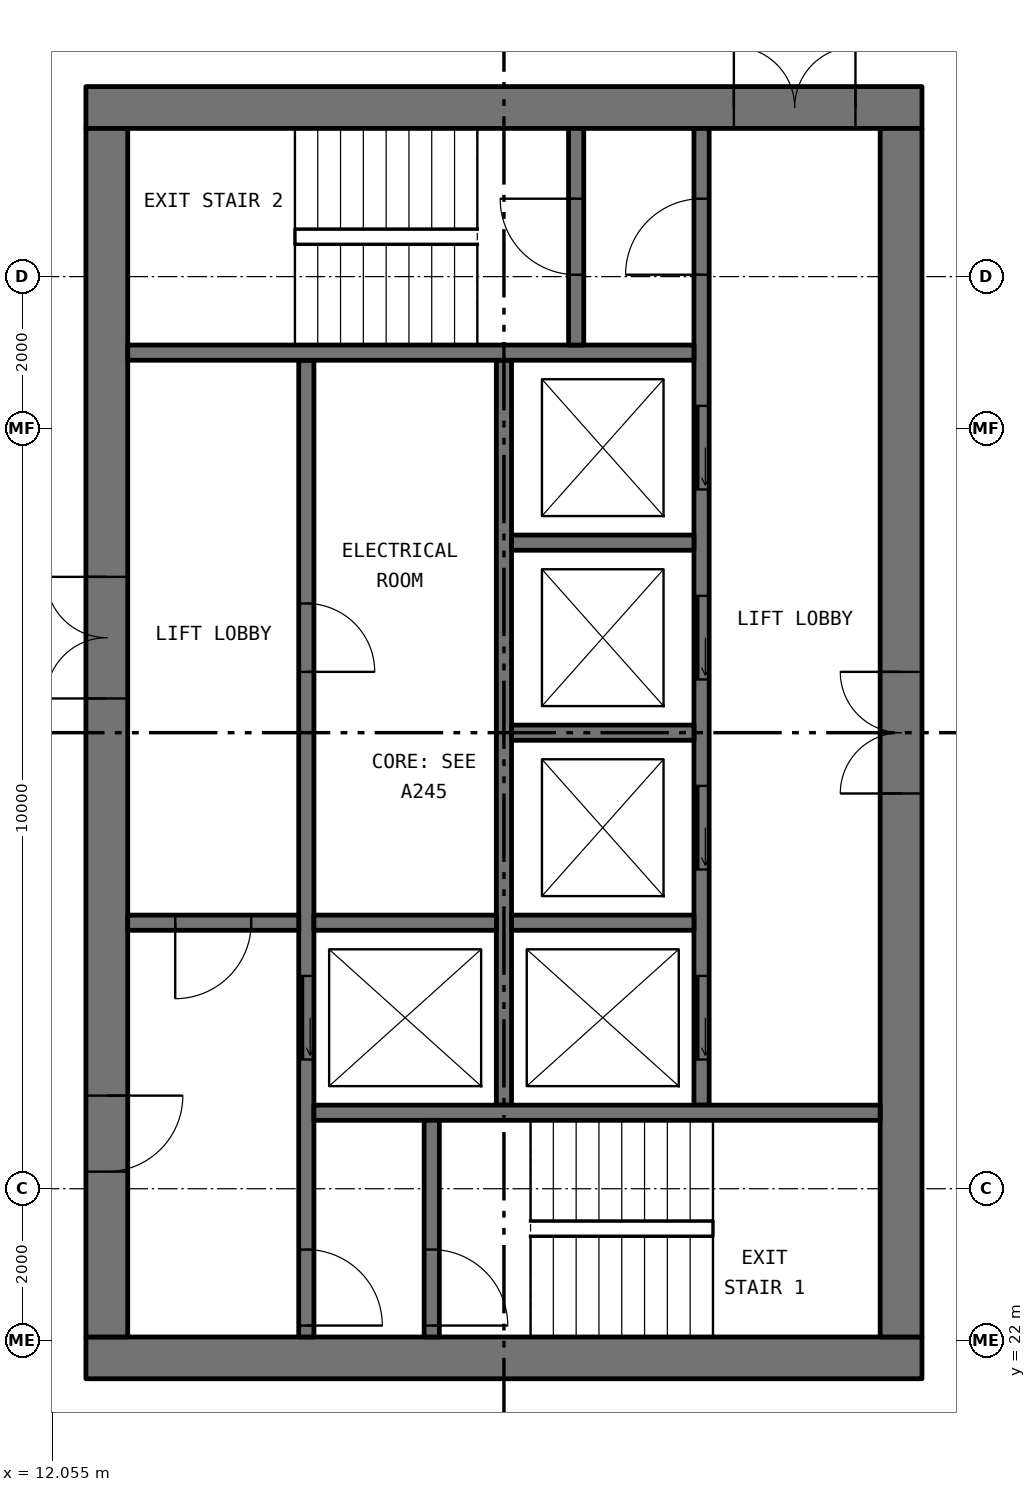
"""IFC4 building model, lengths in metres.
Left out: names, types, materials, properties, quantities, classifications, styles, units other than length and angle.
Written with IfcOpenShell. Run it as: python <this file> out.ifc"""

import sys

from ifc_helpers import new_model, si_unit, direction, frame, frame_2d, origin, place, context, subcontext, project, spatial, rectangle, extrude, element, fill, save


model = new_model("IFC4")
c1 = context("Model", 3, precision=1e-05, world=origin(), true_north=direction((0.0, 1.0)))
c2 = subcontext(c1, "Body", "Model", "MODEL_VIEW")
j1 = project(units=[si_unit("LENGTHUNIT", "METRE"), si_unit("PLANEANGLEUNIT", "RADIAN")], contexts=[c1])
p1 = place(None, origin())
s1 = spatial("IfcSite", under=j1, at=p1, CompositionType="ELEMENT")
p2 = place(p1, origin())
s2 = spatial("IfcBuilding", under=s1, at=p2, CompositionType="ELEMENT")
p3 = place(p2, frame((0.0, 0.0, 168.6)))
s3 = spatial("IfcBuildingStorey", under=s2, at=p3, CompositionType="ELEMENT", Elevation=168.6)
p4 = place(p3, frame((12.5, 21.775, 0.0), z_axis=(0.0, 0.0, 1.0), x_axis=(1.0, 0.0, 0.0)))
e1 = element("IfcWall", 1, at=p4, inside=s3, PredefinedType="SHEAR", context=c2, shape_type="SweptSolid", body=[
    extrude(rectangle(XDim=11.0, YDim=0.55, at=frame_2d((5.5, 0.0))), origin(), (0.0, 0.0, 1.0), 3.05),
])
p5 = place(p3, frame((12.5, 38.225, 0.0), z_axis=(0.0, 0.0, 1.0), x_axis=(1.0, 0.0, 0.0)))
e2 = element("IfcWall", 2, at=p5, inside=s3, PredefinedType="SHEAR", context=c2, shape_type="SweptSolid", body=[
    extrude(rectangle(XDim=11.0, YDim=0.55, at=frame_2d((5.5, 0.0))), origin(), (0.0, 0.0, 1.0), 3.05),
])
p6 = place(p5, frame((8.525, 0.0, 0.0)))
e3 = element("IfcOpeningElement", 3, at=p6, cuts=e2, PredefinedType="OPENING", context=c2, shape_type="SweptSolid", body=[
    extrude(rectangle(XDim=1.6, YDim=2.1, at=frame_2d((0.8, 1.05))), frame((0.0, 0.285, 0.0), z_axis=(0.0, -1.0, 0.0), x_axis=(1.0, 0.0, 0.0)), (0.0, 0.0, 1.0), 0.57),
])
p7 = place(p3, frame((12.775, 22.05, 0.0), z_axis=(0.0, 0.0, 1.0), x_axis=(0.0, 1.0, 0.0)))
e4 = element("IfcWall", 4, at=p7, inside=s3, PredefinedType="SHEAR", context=c2, shape_type="SweptSolid", body=[
    extrude(rectangle(XDim=15.9, YDim=0.55, at=frame_2d((7.95, 0.0))), origin(), (0.0, 0.0, 1.0), 3.05),
])
p8 = place(p7, frame((8.4, 0.0, 0.0)))
e5 = element("IfcOpeningElement", 5, at=p8, cuts=e4, PredefinedType="OPENING", context=c2, shape_type="SweptSolid", body=[
    extrude(rectangle(XDim=1.6, YDim=2.1, at=frame_2d((0.8, 1.05))), frame((0.0, 0.285, 0.0), z_axis=(0.0, -1.0, 0.0), x_axis=(1.0, 0.0, 0.0)), (0.0, 0.0, 1.0), 0.57),
])
p9 = place(p7, frame((2.175, 0.0, 0.0)))
e6 = element("IfcOpeningElement", 6, at=p9, cuts=e4, PredefinedType="OPENING", context=c2, shape_type="SweptSolid", body=[
    extrude(rectangle(XDim=1.0, YDim=2.1, at=frame_2d((0.5, 1.05))), frame((0.0, 0.285, 0.0), z_axis=(0.0, -1.0, 0.0), x_axis=(1.0, 0.0, 0.0)), (0.0, 0.0, 1.0), 0.57),
])
p10 = place(p3, frame((23.225, 22.05, 0.0), z_axis=(0.0, 0.0, 1.0), x_axis=(0.0, 1.0, 0.0)))
e7 = element("IfcWall", 7, at=p10, inside=s3, PredefinedType="SHEAR", context=c2, shape_type="SweptSolid", body=[
    extrude(rectangle(XDim=15.9, YDim=0.55, at=frame_2d((7.95, 0.0))), origin(), (0.0, 0.0, 1.0), 3.05),
])
p11 = place(p10, frame((7.15, 0.0, 0.0)))
e8 = element("IfcOpeningElement", 8, at=p11, cuts=e7, PredefinedType="OPENING", context=c2, shape_type="SweptSolid", body=[
    extrude(rectangle(XDim=1.6, YDim=2.1, at=frame_2d((0.8, 1.05))), frame((0.0, 0.285, 0.0), z_axis=(0.0, -1.0, 0.0), x_axis=(1.0, 0.0, 0.0)), (0.0, 0.0, 1.0), 0.57),
])
p12 = place(p3, frame((15.4, 22.05, 0.0), z_axis=(0.0, 0.0, 1.0), x_axis=(0.0, 1.0, 0.0)))
e9 = element("IfcWall", 9, at=p12, inside=s3, PredefinedType="SOLIDWALL", context=c2, shape_type="SweptSolid", body=[
    extrude(rectangle(XDim=12.85, YDim=0.2, at=frame_2d((6.425, 0.0))), origin(), (0.0, 0.0, 1.0), 3.05),
])
p13 = place(p12, frame((3.65, 0.0, 0.0)))
e10 = element("IfcOpeningElement", 10, at=p13, cuts=e9, PredefinedType="OPENING", context=c2, shape_type="SweptSolid", body=[
    extrude(rectangle(XDim=1.1, YDim=2.1, at=frame_2d((0.55, 1.05))), frame((0.0, 0.11, 0.0), z_axis=(0.0, -1.0, 0.0), x_axis=(1.0, 0.0, 0.0)), (0.0, 0.0, 1.0), 0.22),
])
p14 = place(p12, frame((0.15, 0.0, 0.0)))
e11 = element("IfcOpeningElement", 11, at=p14, cuts=e9, PredefinedType="OPENING", context=c2, shape_type="SweptSolid", body=[
    extrude(rectangle(XDim=1.0, YDim=2.1, at=frame_2d((0.5, 1.05))), frame((0.0, 0.11, 0.0), z_axis=(0.0, -1.0, 0.0), x_axis=(1.0, 0.0, 0.0)), (0.0, 0.0, 1.0), 0.22),
])
p15 = place(p12, frame((8.75, 0.0, 0.0)))
e12 = element("IfcOpeningElement", 12, at=p15, cuts=e9, PredefinedType="OPENING", context=c2, shape_type="SweptSolid", body=[
    extrude(rectangle(XDim=0.9, YDim=2.1, at=frame_2d((0.45, 1.05))), frame((0.0, 0.11, 0.0), z_axis=(0.0, -1.0, 0.0), x_axis=(1.0, 0.0, 0.0)), (0.0, 0.0, 1.0), 0.22),
])
p16 = place(p3, frame((20.6, 25.1, 0.0), z_axis=(0.0, 0.0, 1.0), x_axis=(0.0, 1.0, 0.0)))
e13 = element("IfcWall", 13, at=p16, inside=s3, PredefinedType="SOLIDWALL", context=c2, shape_type="SweptSolid", body=[
    extrude(rectangle(XDim=12.85, YDim=0.2, at=frame_2d((6.425, 0.0))), origin(), (0.0, 0.0, 1.0), 3.05),
])
p17 = place(p16, frame((0.6, 0.0, 0.0)))
e14 = element("IfcOpeningElement", 14, at=p17, cuts=e13, PredefinedType="OPENING", context=c2, shape_type="SweptSolid", body=[
    extrude(rectangle(XDim=1.1, YDim=2.1, at=frame_2d((0.55, 1.05))), frame((0.0, 0.11, 0.0), z_axis=(0.0, -1.0, 0.0), x_axis=(1.0, 0.0, 0.0)), (0.0, 0.0, 1.0), 0.22),
])
p18 = place(p16, frame((3.1, 0.0, 0.0)))
e15 = element("IfcOpeningElement", 15, at=p18, cuts=e13, PredefinedType="OPENING", context=c2, shape_type="SweptSolid", body=[
    extrude(rectangle(XDim=1.1, YDim=2.1, at=frame_2d((0.55, 1.05))), frame((0.0, 0.11, 0.0), z_axis=(0.0, -1.0, 0.0), x_axis=(1.0, 0.0, 0.0)), (0.0, 0.0, 1.0), 0.22),
])
p19 = place(p16, frame((5.6, 0.0, 0.0)))
e16 = element("IfcOpeningElement", 16, at=p19, cuts=e13, PredefinedType="OPENING", context=c2, shape_type="SweptSolid", body=[
    extrude(rectangle(XDim=1.1, YDim=2.1, at=frame_2d((0.55, 1.05))), frame((0.0, 0.11, 0.0), z_axis=(0.0, -1.0, 0.0), x_axis=(1.0, 0.0, 0.0)), (0.0, 0.0, 1.0), 0.22),
])
p20 = place(p16, frame((8.1, 0.0, 0.0)))
e17 = element("IfcOpeningElement", 17, at=p20, cuts=e13, PredefinedType="OPENING", context=c2, shape_type="SweptSolid", body=[
    extrude(rectangle(XDim=1.1, YDim=2.1, at=frame_2d((0.55, 1.05))), frame((0.0, 0.11, 0.0), z_axis=(0.0, -1.0, 0.0), x_axis=(1.0, 0.0, 0.0)), (0.0, 0.0, 1.0), 0.22),
])
p21 = place(p16, frame((10.925, 0.0, 0.0)))
e18 = element("IfcOpeningElement", 18, at=p21, cuts=e13, PredefinedType="OPENING", context=c2, shape_type="SweptSolid", body=[
    extrude(rectangle(XDim=1.0, YDim=2.1, at=frame_2d((0.5, 1.05))), frame((0.0, 0.11, 0.0), z_axis=(0.0, -1.0, 0.0), x_axis=(1.0, 0.0, 0.0)), (0.0, 0.0, 1.0), 0.22),
])
p22 = place(p3, frame((18.0, 25.1, 0.0), z_axis=(0.0, 0.0, 1.0), x_axis=(0.0, 1.0, 0.0)))
e19 = element("IfcWall", 19, at=p22, inside=s3, PredefinedType="SOLIDWALL", context=c2, shape_type="SweptSolid", body=[
    extrude(rectangle(XDim=9.8, YDim=0.2, at=frame_2d((4.9, 0.0))), origin(), (0.0, 0.0, 1.0), 3.05),
])
for number, where, z_axis, x_axis in (
    (20, (15.5, 25.0, 0.0), (0.0, 0.0, 1.0), (1.0, 0.0, 0.0)),
    (21, (13.05, 35.0, 0.0), (0.0, 0.0, 1.0), (1.0, 0.0, 0.0)),
):
    element("IfcWall", number, at=place(p3, frame(where, z_axis=z_axis, x_axis=x_axis)), inside=s3, PredefinedType="SOLIDWALL", context=c2, shape_type="SweptSolid", body=[
        extrude(rectangle(XDim=7.45, YDim=0.2, at=frame_2d((3.725, 0.0))), origin(), (0.0, 0.0, 1.0), 3.05),
    ])
p23 = place(p3, frame((13.05, 27.5, 0.0), z_axis=(0.0, 0.0, 1.0), x_axis=(1.0, 0.0, 0.0)))
e22 = element("IfcWall", 22, at=p23, inside=s3, PredefinedType="SOLIDWALL", context=c2, shape_type="SweptSolid", body=[
    extrude(rectangle(XDim=2.25, YDim=0.2, at=frame_2d((1.125, 0.0))), origin(), (0.0, 0.0, 1.0), 3.05),
])
p24 = place(p23, frame((0.625, 0.0, 0.0)))
e23 = element("IfcOpeningElement", 23, at=p24, cuts=e22, PredefinedType="OPENING", context=c2, shape_type="SweptSolid", body=[
    extrude(rectangle(XDim=1.0, YDim=2.1, at=frame_2d((0.5, 1.05))), frame((0.0, 0.11, 0.0), z_axis=(0.0, -1.0, 0.0), x_axis=(1.0, 0.0, 0.0)), (0.0, 0.0, 1.0), 0.22),
])
p25 = place(p3, frame((17.05, 22.05, 0.0), z_axis=(0.0, 0.0, 1.0), x_axis=(0.0, 1.0, 0.0)))
e24 = element("IfcWall", 24, at=p25, inside=s3, PredefinedType="SOLIDWALL", context=c2, shape_type="SweptSolid", body=[
    extrude(rectangle(XDim=2.85, YDim=0.2, at=frame_2d((1.425, 0.0))), origin(), (0.0, 0.0, 1.0), 3.05),
])
p26 = place(p25, frame((0.15, 0.0, 0.0)))
e25 = element("IfcOpeningElement", 25, at=p26, cuts=e24, PredefinedType="OPENING", context=c2, shape_type="SweptSolid", body=[
    extrude(rectangle(XDim=1.0, YDim=2.1, at=frame_2d((0.5, 1.05))), frame((0.0, 0.11, 0.0), z_axis=(0.0, -1.0, 0.0), x_axis=(1.0, 0.0, 0.0)), (0.0, 0.0, 1.0), 0.22),
])
p27 = place(p3, frame((18.95, 35.1, 0.0), z_axis=(0.0, 0.0, 1.0), x_axis=(0.0, 1.0, 0.0)))
e26 = element("IfcWall", 26, at=p27, inside=s3, PredefinedType="SOLIDWALL", context=c2, shape_type="SweptSolid", body=[
    extrude(rectangle(XDim=2.85, YDim=0.2, at=frame_2d((1.425, 0.0))), origin(), (0.0, 0.0, 1.0), 3.05),
])
p28 = place(p27, frame((0.925, 0.0, 0.0)))
e27 = element("IfcOpeningElement", 27, at=p28, cuts=e26, PredefinedType="OPENING", context=c2, shape_type="SweptSolid", body=[
    extrude(rectangle(XDim=1.0, YDim=2.1, at=frame_2d((0.5, 1.05))), frame((0.0, 0.11, 0.0), z_axis=(0.0, -1.0, 0.0), x_axis=(1.0, 0.0, 0.0)), (0.0, 0.0, 1.0), 0.22),
])
for number, where, z_axis, x_axis in (
    (28, (15.5, 27.5, 0.0), (0.0, 0.0, 1.0), (1.0, 0.0, 0.0)),
    (29, (18.1, 27.5, 0.0), (0.0, 0.0, 1.0), (1.0, 0.0, 0.0)),
    (30, (18.1, 30.0, 0.0), (0.0, 0.0, 1.0), (1.0, 0.0, 0.0)),
    (31, (18.1, 32.5, 0.0), (0.0, 0.0, 1.0), (1.0, 0.0, 0.0)),
):
    element("IfcWall", number, at=place(p3, frame(where, z_axis=z_axis, x_axis=x_axis)), inside=s3, PredefinedType="SOLIDWALL", context=c2, shape_type="SweptSolid", body=[
        extrude(rectangle(XDim=2.4, YDim=0.2, at=frame_2d((1.2, 0.0))), origin(), (0.0, 0.0, 1.0), 3.05),
    ])
p29 = place(p17, origin())
e32 = element("IfcDoor", 32, at=p29, inside=s3, OperationType="SLIDING_TO_LEFT", PredefinedType="DOOR", context=c2, shape_type="SweptSolid", body=[
    extrude(rectangle(XDim=1.1, YDim=2.1, at=frame_2d((0.55, 1.05))), frame((0.0, 0.025, 0.0), z_axis=(0.0, -1.0, 0.0), x_axis=(1.0, 0.0, 0.0)), (0.0, 0.0, 1.0), 0.05),
])
fill(e14, e32)
p30 = place(p18, origin())
e33 = element("IfcDoor", 33, at=p30, inside=s3, OperationType="SLIDING_TO_LEFT", PredefinedType="DOOR", context=c2, shape_type="SweptSolid", body=[
    extrude(rectangle(XDim=1.1, YDim=2.1, at=frame_2d((0.55, 1.05))), frame((0.0, 0.025, 0.0), z_axis=(0.0, -1.0, 0.0), x_axis=(1.0, 0.0, 0.0)), (0.0, 0.0, 1.0), 0.05),
])
fill(e15, e33)
p31 = place(p19, origin())
e34 = element("IfcDoor", 34, at=p31, inside=s3, OperationType="SLIDING_TO_LEFT", PredefinedType="DOOR", context=c2, shape_type="SweptSolid", body=[
    extrude(rectangle(XDim=1.1, YDim=2.1, at=frame_2d((0.55, 1.05))), frame((0.0, 0.025, 0.0), z_axis=(0.0, -1.0, 0.0), x_axis=(1.0, 0.0, 0.0)), (0.0, 0.0, 1.0), 0.05),
])
fill(e16, e34)
p32 = place(p20, origin())
e35 = element("IfcDoor", 35, at=p32, inside=s3, OperationType="SLIDING_TO_LEFT", PredefinedType="DOOR", context=c2, shape_type="SweptSolid", body=[
    extrude(rectangle(XDim=1.1, YDim=2.1, at=frame_2d((0.55, 1.05))), frame((0.0, 0.025, 0.0), z_axis=(0.0, -1.0, 0.0), x_axis=(1.0, 0.0, 0.0)), (0.0, 0.0, 1.0), 0.05),
])
fill(e17, e35)
p33 = place(p13, origin())
e36 = element("IfcDoor", 36, at=p33, inside=s3, OperationType="SLIDING_TO_LEFT", PredefinedType="DOOR", context=c2, shape_type="SweptSolid", body=[
    extrude(rectangle(XDim=1.1, YDim=2.1, at=frame_2d((0.55, 1.05))), frame((0.0, 0.025, 0.0), z_axis=(0.0, -1.0, 0.0), x_axis=(1.0, 0.0, 0.0)), (0.0, 0.0, 1.0), 0.05),
])
fill(e10, e36)
p34 = place(p26, frame((1.0, 0.0, 0.0), x_axis=(-1.0, 0.0, 0.0)))
e37 = element("IfcDoor", 37, at=p34, inside=s3, OperationType="SINGLE_SWING_LEFT", PredefinedType="DOOR", context=c2, shape_type="SweptSolid", body=[
    extrude(rectangle(XDim=1.0, YDim=2.1, at=frame_2d((0.5, 1.05))), frame((0.0, 0.025, 0.0), z_axis=(0.0, -1.0, 0.0), x_axis=(1.0, 0.0, 0.0)), (0.0, 0.0, 1.0), 0.05),
])
fill(e25, e37)
p35 = place(p14, frame((1.0, 0.0, 0.0), x_axis=(-1.0, 0.0, 0.0)))
e38 = element("IfcDoor", 38, at=p35, inside=s3, OperationType="SINGLE_SWING_LEFT", PredefinedType="DOOR", context=c2, shape_type="SweptSolid", body=[
    extrude(rectangle(XDim=1.0, YDim=2.1, at=frame_2d((0.5, 1.05))), frame((0.0, 0.025, 0.0), z_axis=(0.0, -1.0, 0.0), x_axis=(1.0, 0.0, 0.0)), (0.0, 0.0, 1.0), 0.05),
])
fill(e11, e38)
p36 = place(p21, origin())
e39 = element("IfcDoor", 39, at=p36, inside=s3, OperationType="SINGLE_SWING_RIGHT", PredefinedType="DOOR", context=c2, shape_type="SweptSolid", body=[
    extrude(rectangle(XDim=1.0, YDim=2.1, at=frame_2d((0.5, 1.05))), frame((0.0, 0.025, 0.0), z_axis=(0.0, -1.0, 0.0), x_axis=(1.0, 0.0, 0.0)), (0.0, 0.0, 1.0), 0.05),
])
fill(e18, e39)
p37 = place(p28, origin())
e40 = element("IfcDoor", 40, at=p37, inside=s3, OperationType="SINGLE_SWING_LEFT", PredefinedType="DOOR", context=c2, shape_type="SweptSolid", body=[
    extrude(rectangle(XDim=1.0, YDim=2.1, at=frame_2d((0.5, 1.05))), frame((0.0, 0.025, 0.0), z_axis=(0.0, -1.0, 0.0), x_axis=(1.0, 0.0, 0.0)), (0.0, 0.0, 1.0), 0.05),
])
fill(e27, e40)
p38 = place(p24, frame((1.0, 0.0, 0.0), x_axis=(-1.0, 0.0, 0.0)))
e41 = element("IfcDoor", 41, at=p38, inside=s3, OperationType="SINGLE_SWING_LEFT", PredefinedType="DOOR", context=c2, shape_type="SweptSolid", body=[
    extrude(rectangle(XDim=1.0, YDim=2.1, at=frame_2d((0.5, 1.05))), frame((0.0, 0.025, 0.0), z_axis=(0.0, -1.0, 0.0), x_axis=(1.0, 0.0, 0.0)), (0.0, 0.0, 1.0), 0.05),
])
fill(e23, e41)
p39 = place(p8, origin())
e42 = element("IfcDoor", 42, at=p39, inside=s3, OperationType="DOUBLE_DOOR_SINGLE_SWING", PredefinedType="DOOR", context=c2, shape_type="SweptSolid", body=[
    extrude(rectangle(XDim=1.6, YDim=2.1, at=frame_2d((0.8, 1.05))), frame((0.0, 0.025, 0.0), z_axis=(0.0, -1.0, 0.0), x_axis=(1.0, 0.0, 0.0)), (0.0, 0.0, 1.0), 0.05),
])
fill(e5, e42)
p40 = place(p9, frame((1.0, 0.0, 0.0), x_axis=(-1.0, 0.0, 0.0)))
e43 = element("IfcDoor", 43, at=p40, inside=s3, OperationType="SINGLE_SWING_RIGHT", PredefinedType="DOOR", context=c2, shape_type="SweptSolid", body=[
    extrude(rectangle(XDim=1.0, YDim=2.1, at=frame_2d((0.5, 1.05))), frame((0.0, 0.025, 0.0), z_axis=(0.0, -1.0, 0.0), x_axis=(1.0, 0.0, 0.0)), (0.0, 0.0, 1.0), 0.05),
])
fill(e6, e43)
p41 = place(p6, origin())
e44 = element("IfcDoor", 44, at=p41, inside=s3, OperationType="DOUBLE_DOOR_SINGLE_SWING", PredefinedType="DOOR", context=c2, shape_type="SweptSolid", body=[
    extrude(rectangle(XDim=1.6, YDim=2.1, at=frame_2d((0.8, 1.05))), frame((0.0, 0.025, 0.0), z_axis=(0.0, -1.0, 0.0), x_axis=(1.0, 0.0, 0.0)), (0.0, 0.0, 1.0), 0.05),
])
fill(e3, e44)
p42 = place(p11, origin())
e45 = element("IfcDoor", 45, at=p42, inside=s3, OperationType="DOUBLE_DOOR_SINGLE_SWING", PredefinedType="DOOR", context=c2, shape_type="SweptSolid", body=[
    extrude(rectangle(XDim=1.6, YDim=2.1, at=frame_2d((0.8, 1.05))), frame((0.0, 0.025, 0.0), z_axis=(0.0, -1.0, 0.0), x_axis=(1.0, 0.0, 0.0)), (0.0, 0.0, 1.0), 0.05),
])
fill(e8, e45)
p43 = place(p15, frame((0.9, 0.0, 0.0), x_axis=(-1.0, 0.0, 0.0)))
e46 = element("IfcDoor", 46, at=p43, inside=s3, OperationType="SINGLE_SWING_LEFT", PredefinedType="DOOR", context=c2, shape_type="SweptSolid", body=[
    extrude(rectangle(XDim=0.9, YDim=2.1, at=frame_2d((0.45, 1.05))), frame((0.0, 0.025, 0.0), z_axis=(0.0, -1.0, 0.0), x_axis=(1.0, 0.0, 0.0)), (0.0, 0.0, 1.0), 0.05),
])
fill(e12, e46)
save(model, sys.argv[1])
